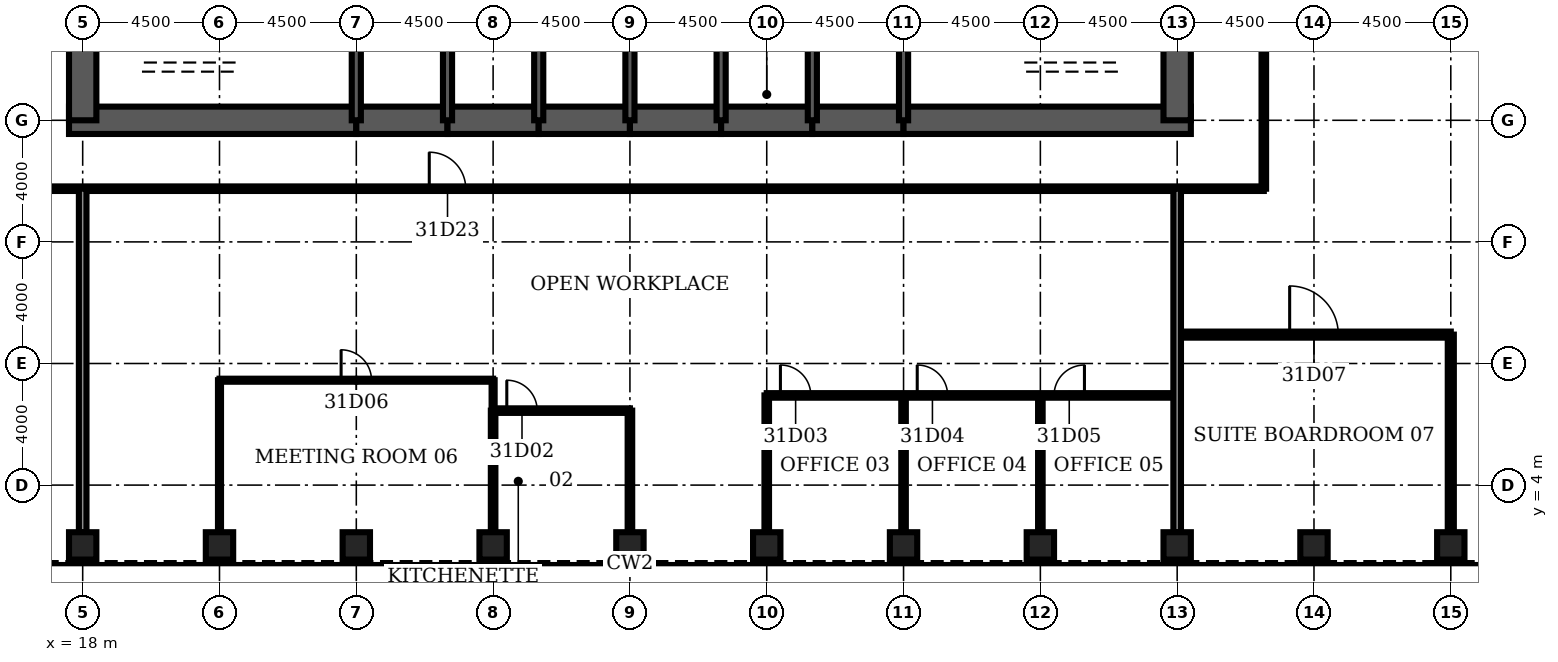
"""IFC4 building model, lengths in metres.
Left out: names, types, materials, properties, quantities, classifications, styles, units other than length and angle.
Written with IfcOpenShell. Run it as: python <this file> out.ifc"""

import sys

from ifc_helpers import new_model, si_unit, direction, frame, frame_2d, origin, origin_2d, place, context, subcontext, project, spatial, rectangle, hollow_rectangle, extrude, element, fill, save


model = new_model("IFC4")
c1 = context("Model", 3, precision=1e-05, world=origin(), true_north=direction((0.0, 1.0)))
c2 = subcontext(c1, "Body", "Model", "MODEL_VIEW")
j1 = project(units=[si_unit("LENGTHUNIT", "METRE"), si_unit("PLANEANGLEUNIT", "RADIAN")], contexts=[c1])
p1 = place(None, origin())
s1 = spatial("IfcSite", under=j1, at=p1, CompositionType="ELEMENT")
p2 = place(p1, origin())
s2 = spatial("IfcBuilding", under=s1, at=p2, CompositionType="ELEMENT")
p3 = place(p2, frame((0.0, 0.0, 142.5)))
s3 = spatial("IfcBuildingStorey", under=s2, at=p3, CompositionType="ELEMENT", Elevation=142.5)
for number, where, z_axis, x_axis in (
    (1, (18.0, 2.0, 0.0), (0.0, 0.0, 1.0), (0.0, 1.0, 0.0)),
    (2, (22.5, 2.0, 0.0), (0.0, 0.0, 1.0), (0.0, 1.0, 0.0)),
    (3, (27.0, 2.0, 0.0), (0.0, 0.0, 1.0), (0.0, 1.0, 0.0)),
    (4, (31.5, 2.0, 0.0), (0.0, 0.0, 1.0), (0.0, 1.0, 0.0)),
    (5, (36.0, 2.0, 0.0), (0.0, 0.0, 1.0), (0.0, 1.0, 0.0)),
    (6, (40.5, 2.0, 0.0), (0.0, 0.0, 1.0), (0.0, 1.0, 0.0)),
    (7, (45.0, 2.0, 0.0), (0.0, 0.0, 1.0), (0.0, 1.0, 0.0)),
    (8, (49.5, 2.0, 0.0), (0.0, 0.0, 1.0), (0.0, 1.0, 0.0)),
    (9, (54.0, 2.0, 0.0), (0.0, 0.0, 1.0), (0.0, 1.0, 0.0)),
    (10, (58.5, 2.0, 0.0), (0.0, 0.0, 1.0), (0.0, 1.0, 0.0)),
    (11, (63.0, 2.0, 0.0), (0.0, 0.0, 1.0), (0.0, 1.0, 0.0)),
):
    element("IfcColumn", number, at=place(p3, frame(where, z_axis=z_axis, x_axis=x_axis)), inside=s3, PredefinedType="COLUMN", context=c2, shape_type="SweptSolid", body=[
        extrude(hollow_rectangle(XDim=0.9, YDim=0.9, WallThickness=0.1, at=origin_2d()), origin(), (0.0, 0.0, 1.0), 4.2),
    ])
p4 = place(p3, frame((17.55, 16.0, 0.0), z_axis=(0.0, 0.0, 1.0), x_axis=(1.0, 0.0, 0.0)))
e12 = element("IfcWall", 12, at=p4, inside=s3, PredefinedType="SHEAR", context=c2, shape_type="SweptSolid", body=[
    extrude(rectangle(XDim=9.45, YDim=0.9, at=frame_2d((4.725, 0.0))), origin(), (0.0, 0.0, 1.0), 4.2),
])
for number, where, z_axis, x_axis in (
    (13, (27.0, 16.0, 0.0), (0.0, 0.0, 1.0), (1.0, 0.0, 0.0)),
    (14, (30.0, 16.0, 0.0), (0.0, 0.0, 1.0), (1.0, 0.0, 0.0)),
    (15, (33.0, 16.0, 0.0), (0.0, 0.0, 1.0), (1.0, 0.0, 0.0)),
    (16, (36.0, 16.0, 0.0), (0.0, 0.0, 1.0), (1.0, 0.0, 0.0)),
    (17, (39.0, 16.0, 0.0), (0.0, 0.0, 1.0), (1.0, 0.0, 0.0)),
    (18, (42.0, 16.0, 0.0), (0.0, 0.0, 1.0), (1.0, 0.0, 0.0)),
):
    element("IfcWall", number, at=place(p3, frame(where, z_axis=z_axis, x_axis=x_axis)), inside=s3, PredefinedType="SHEAR", context=c2, shape_type="SweptSolid", body=[
        extrude(rectangle(XDim=3.0, YDim=0.9, at=frame_2d((1.5, 0.0))), origin(), (0.0, 0.0, 1.0), 4.2),
    ])
p5 = place(p3, frame((45.0, 16.0, 0.0), z_axis=(0.0, 0.0, 1.0), x_axis=(1.0, 0.0, 0.0)))
e19 = element("IfcWall", 19, at=p5, inside=s3, PredefinedType="SHEAR", context=c2, shape_type="SweptSolid", body=[
    extrude(rectangle(XDim=9.45, YDim=0.9, at=frame_2d((4.725, 0.0))), origin(), (0.0, 0.0, 1.0), 4.2),
])
for number, where, z_axis, x_axis in (
    (20, (18.0, 19.2, 0.0), (0.0, 0.0, 1.0), (0.0, -1.0, 0.0)),
    (21, (54.0, 16.0, 0.0), (0.0, 0.0, 1.0), (0.0, 1.0, 0.0)),
):
    element("IfcWall", number, at=place(p3, frame(where, z_axis=z_axis, x_axis=x_axis)), inside=s3, PredefinedType="SHEAR", context=c2, shape_type="SweptSolid", body=[
        extrude(rectangle(XDim=3.2, YDim=0.9, at=frame_2d((1.6, 0.0))), origin(), (0.0, 0.0, 1.0), 4.2),
    ])
for number, where, z_axis, x_axis in (
    (22, (27.0, 16.0, 0.0), (0.0, 0.0, 1.0), (0.0, 1.0, 0.0)),
    (23, (30.0, 16.0, 0.0), (0.0, 0.0, 1.0), (0.0, 1.0, 0.0)),
    (24, (33.0, 16.0, 0.0), (0.0, 0.0, 1.0), (0.0, 1.0, 0.0)),
    (25, (36.0, 16.0, 0.0), (0.0, 0.0, 1.0), (0.0, 1.0, 0.0)),
    (26, (39.0, 16.0, 0.0), (0.0, 0.0, 1.0), (0.0, 1.0, 0.0)),
    (27, (42.0, 16.0, 0.0), (0.0, 0.0, 1.0), (0.0, 1.0, 0.0)),
    (28, (45.0, 16.0, 0.0), (0.0, 0.0, 1.0), (0.0, 1.0, 0.0)),
):
    element("IfcWall", number, at=place(p3, frame(where, z_axis=z_axis, x_axis=x_axis)), inside=s3, PredefinedType="SOLIDWALL", context=c2, shape_type="SweptSolid", body=[
        extrude(rectangle(XDim=3.2, YDim=0.3, at=frame_2d((1.6, 0.0))), origin(), (0.0, 0.0, 1.0), 4.2),
    ])
p6 = place(p3, frame((39.15, 17.4, 0.0), z_axis=(0.0, 0.0, 1.0), x_axis=(1.0, 0.0, 0.0)))
e29 = element("IfcWall", 29, at=p6, inside=s3, PredefinedType="SOLIDWALL", context=c2, shape_type="SweptSolid", body=[
    extrude(rectangle(XDim=2.7, YDim=0.3, at=frame_2d((1.35, 0.0))), origin(), (0.0, 0.0, 1.0), 4.04),
])
p7 = place(p6, frame((0.85, 0.0, 0.0)))
e30 = element("IfcOpeningElement", 30, at=p7, cuts=e29, PredefinedType="OPENING", context=c2, shape_type="SweptSolid", body=[
    extrude(rectangle(XDim=1.0, YDim=2.1, at=frame_2d((0.5, 1.05))), frame((0.0, 0.16, 0.0), z_axis=(0.0, -1.0, 0.0), x_axis=(1.0, 0.0, 0.0)), (0.0, 0.0, 1.0), 0.32),
])
p8 = place(p3, frame((31.5, 6.45, 0.0), z_axis=(0.0, 0.0, 1.0), x_axis=(1.0, 0.0, 0.0)))
e31 = element("IfcWall", 31, at=p8, inside=s3, PredefinedType="PARTITIONING", context=c2, shape_type="SweptSolid", body=[
    extrude(rectangle(XDim=4.5, YDim=0.15, at=frame_2d((2.25, 0.0))), origin(), (0.0, 0.0, 1.0), 3.0),
])
p9 = place(p8, frame((0.45, 0.0, 0.0)))
e32 = element("IfcOpeningElement", 32, at=p9, cuts=e31, PredefinedType="OPENING", context=c2, shape_type="SweptSolid", body=[
    extrude(rectangle(XDim=1.0, YDim=2.1, at=frame_2d((0.5, 1.05))), frame((0.0, 0.085, 0.0), z_axis=(0.0, -1.0, 0.0), x_axis=(1.0, 0.0, 0.0)), (0.0, 0.0, 1.0), 0.17),
])
p10 = place(p3, frame((40.5, 6.95, 0.0), z_axis=(0.0, 0.0, 1.0), x_axis=(1.0, 0.0, 0.0)))
e33 = element("IfcWall", 33, at=p10, inside=s3, PredefinedType="PARTITIONING", context=c2, shape_type="SweptSolid", body=[
    extrude(rectangle(XDim=13.5, YDim=0.15, at=frame_2d((6.75, 0.0))), origin(), (0.0, 0.0, 1.0), 3.0),
])
p11 = place(p10, frame((0.45, 0.0, 0.0)))
e34 = element("IfcOpeningElement", 34, at=p11, cuts=e33, PredefinedType="OPENING", context=c2, shape_type="SweptSolid", body=[
    extrude(rectangle(XDim=1.0, YDim=2.1, at=frame_2d((0.5, 1.05))), frame((0.0, 0.085, 0.0), z_axis=(0.0, -1.0, 0.0), x_axis=(1.0, 0.0, 0.0)), (0.0, 0.0, 1.0), 0.17),
])
p12 = place(p10, frame((4.95, 0.0, 0.0)))
e35 = element("IfcOpeningElement", 35, at=p12, cuts=e33, PredefinedType="OPENING", context=c2, shape_type="SweptSolid", body=[
    extrude(rectangle(XDim=1.0, YDim=2.1, at=frame_2d((0.5, 1.05))), frame((0.0, 0.085, 0.0), z_axis=(0.0, -1.0, 0.0), x_axis=(1.0, 0.0, 0.0)), (0.0, 0.0, 1.0), 0.17),
])
p13 = place(p10, frame((9.45, 0.0, 0.0)))
e36 = element("IfcOpeningElement", 36, at=p13, cuts=e33, PredefinedType="OPENING", context=c2, shape_type="SweptSolid", body=[
    extrude(rectangle(XDim=1.0, YDim=2.1, at=frame_2d((0.5, 1.05))), frame((0.0, 0.085, 0.0), z_axis=(0.0, -1.0, 0.0), x_axis=(1.0, 0.0, 0.0)), (0.0, 0.0, 1.0), 0.17),
])
p14 = place(p3, frame((22.5, 7.45, 0.0), z_axis=(0.0, 0.0, 1.0), x_axis=(1.0, 0.0, 0.0)))
e37 = element("IfcWall", 37, at=p14, inside=s3, PredefinedType="PARTITIONING", context=c2, shape_type="SweptSolid", body=[
    extrude(rectangle(XDim=9.0, YDim=0.1, at=frame_2d((4.5, 0.0))), origin(), (0.0, 0.0, 1.0), 3.0),
])
p15 = place(p14, frame((4.0, 0.0, 0.0)))
e38 = element("IfcOpeningElement", 38, at=p15, cuts=e37, PredefinedType="OPENING", context=c2, shape_type="SweptSolid", body=[
    extrude(rectangle(XDim=1.0, YDim=2.1, at=frame_2d((0.5, 1.05))), frame((0.0, 0.06, 0.0), z_axis=(0.0, -1.0, 0.0), x_axis=(1.0, 0.0, 0.0)), (0.0, 0.0, 1.0), 0.12),
])
p16 = place(p3, frame((54.0, 8.95, 0.0), z_axis=(0.0, 0.0, 1.0), x_axis=(1.0, 0.0, 0.0)))
e39 = element("IfcWall", 39, at=p16, inside=s3, PredefinedType="PARTITIONING", context=c2, shape_type="SweptSolid", body=[
    extrude(rectangle(XDim=9.0, YDim=0.2, at=frame_2d((4.5, 0.0))), origin(), (0.0, 0.0, 1.0), 3.0),
])
p17 = place(p16, frame((3.7, 0.0, 0.0)))
e40 = element("IfcOpeningElement", 40, at=p17, cuts=e39, PredefinedType="OPENING", context=c2, shape_type="SweptSolid", body=[
    extrude(rectangle(XDim=1.6, YDim=2.1, at=frame_2d((0.8, 1.05))), frame((0.0, 0.11, 0.0), z_axis=(0.0, -1.0, 0.0), x_axis=(1.0, 0.0, 0.0)), (0.0, 0.0, 1.0), 0.22),
])
p18 = place(p3, frame((15.15, 13.75, 0.0), z_axis=(0.0, 0.0, 1.0), x_axis=(1.0, 0.0, 0.0)))
e41 = element("IfcWall", 41, at=p18, inside=s3, PredefinedType="PARTITIONING", context=c2, shape_type="SweptSolid", body=[
    extrude(rectangle(XDim=41.7, YDim=0.15, at=frame_2d((20.85, 0.0))), origin(), (0.0, 0.0, 1.0), 3.0),
])
p19 = place(p18, frame((14.25, 0.0, 0.0)))
e42 = element("IfcOpeningElement", 42, at=p19, cuts=e41, PredefinedType="OPENING", context=c2, shape_type="SweptSolid", body=[
    extrude(rectangle(XDim=1.2, YDim=2.1, at=frame_2d((0.6, 1.05))), frame((0.0, 0.085, 0.0), z_axis=(0.0, -1.0, 0.0), x_axis=(1.0, 0.0, 0.0)), (0.0, 0.0, 1.0), 0.17),
])
p20 = place(p3, frame((18.0, 2.45, 0.0), z_axis=(0.0, 0.0, 1.0), x_axis=(0.0, 1.0, 0.0)))
e43 = element("IfcWall", 43, at=p20, inside=s3, PredefinedType="PARTITIONING", context=c2, shape_type="SweptSolid", body=[
    extrude(rectangle(XDim=11.3, YDim=0.25, at=frame_2d((5.65, 0.0))), origin(), (0.0, 0.0, 1.0), 3.0),
])
p21 = place(p3, frame((22.5, 2.45, 0.0), z_axis=(0.0, 0.0, 1.0), x_axis=(0.0, 1.0, 0.0)))
e44 = element("IfcWall", 44, at=p21, inside=s3, PredefinedType="PARTITIONING", context=c2, shape_type="SweptSolid", body=[
    extrude(rectangle(XDim=5.0, YDim=0.1, at=frame_2d((2.5, 0.0))), origin(), (0.0, 0.0, 1.0), 3.0),
])
p22 = place(p3, frame((31.5, 2.45, 0.0), z_axis=(0.0, 0.0, 1.0), x_axis=(0.0, 1.0, 0.0)))
e45 = element("IfcWall", 45, at=p22, inside=s3, PredefinedType="PARTITIONING", context=c2, shape_type="SweptSolid", body=[
    extrude(rectangle(XDim=4.0, YDim=0.15, at=frame_2d((2.0, 0.0))), origin(), (0.0, 0.0, 1.0), 3.0),
])
p23 = place(p3, frame((31.5, 6.45, 0.0), z_axis=(0.0, 0.0, 1.0), x_axis=(0.0, 1.0, 0.0)))
e46 = element("IfcWall", 46, at=p23, inside=s3, PredefinedType="PARTITIONING", context=c2, shape_type="SweptSolid", body=[
    extrude(rectangle(XDim=1.0, YDim=0.1, at=frame_2d((0.5, 0.0))), origin(), (0.0, 0.0, 1.0), 3.0),
])
p24 = place(p3, frame((36.0, 2.45, 0.0), z_axis=(0.0, 0.0, 1.0), x_axis=(0.0, 1.0, 0.0)))
e47 = element("IfcWall", 47, at=p24, inside=s3, PredefinedType="PARTITIONING", context=c2, shape_type="SweptSolid", body=[
    extrude(rectangle(XDim=4.0, YDim=0.15, at=frame_2d((2.0, 0.0))), origin(), (0.0, 0.0, 1.0), 3.0),
])
for number, where, z_axis, x_axis in (
    (48, (40.5, 2.45, 0.0), (0.0, 0.0, 1.0), (0.0, 1.0, 0.0)),
    (49, (45.0, 2.45, 0.0), (0.0, 0.0, 1.0), (0.0, 1.0, 0.0)),
    (50, (49.5, 2.45, 0.0), (0.0, 0.0, 1.0), (0.0, 1.0, 0.0)),
):
    element("IfcWall", number, at=place(p3, frame(where, z_axis=z_axis, x_axis=x_axis)), inside=s3, PredefinedType="PARTITIONING", context=c2, shape_type="SweptSolid", body=[
        extrude(rectangle(XDim=4.5, YDim=0.15, at=frame_2d((2.25, 0.0))), origin(), (0.0, 0.0, 1.0), 3.0),
    ])
p25 = place(p3, frame((54.0, 2.45, 0.0), z_axis=(0.0, 0.0, 1.0), x_axis=(0.0, 1.0, 0.0)))
e51 = element("IfcWall", 51, at=p25, inside=s3, PredefinedType="PARTITIONING", context=c2, shape_type="SweptSolid", body=[
    extrude(rectangle(XDim=11.3, YDim=0.25, at=frame_2d((5.65, 0.0))), origin(), (0.0, 0.0, 1.0), 3.0),
])
p26 = place(p3, frame((56.85, 13.75, 0.0), z_axis=(0.0, 0.0, 1.0), x_axis=(0.0, 1.0, 0.0)))
e52 = element("IfcWall", 52, at=p26, inside=s3, PredefinedType="PARTITIONING", context=c2, shape_type="SweptSolid", body=[
    extrude(rectangle(XDim=20.5, YDim=0.15, at=frame_2d((10.25, 0.0))), origin(), (0.0, 0.0, 1.0), 3.0),
])
p27 = place(p26, frame((9.65, 0.0, 0.0)))
e53 = element("IfcOpeningElement", 53, at=p27, cuts=e52, PredefinedType="OPENING", context=c2, shape_type="SweptSolid", body=[
    extrude(rectangle(XDim=1.2, YDim=2.1, at=frame_2d((0.6, 1.05))), frame((0.0, 0.085, 0.0), z_axis=(0.0, -1.0, 0.0), x_axis=(1.0, 0.0, 0.0)), (0.0, 0.0, 1.0), 0.17),
])
p28 = place(p3, frame((63.0, 2.45, 0.0), z_axis=(0.0, 0.0, 1.0), x_axis=(0.0, 1.0, 0.0)))
e54 = element("IfcWall", 54, at=p28, inside=s3, PredefinedType="PARTITIONING", context=c2, shape_type="SweptSolid", body=[
    extrude(rectangle(XDim=6.5, YDim=0.2, at=frame_2d((3.25, 0.0))), origin(), (0.0, 0.0, 1.0), 3.0),
])
p29 = place(p7, origin())
e55 = element("IfcDoor", 55, at=p29, inside=s3, OperationType="SINGLE_SWING_LEFT", PredefinedType="DOOR", context=c2, shape_type="SweptSolid", body=[
    extrude(rectangle(XDim=1.0, YDim=2.1, at=frame_2d((0.5, 1.05))), frame((0.0, 0.025, 0.0), z_axis=(0.0, -1.0, 0.0), x_axis=(1.0, 0.0, 0.0)), (0.0, 0.0, 1.0), 0.05),
])
fill(e30, e55)
p30 = place(p9, origin())
e56 = element("IfcDoor", 56, at=p30, inside=s3, OperationType="SINGLE_SWING_LEFT", PredefinedType="DOOR", context=c2, shape_type="SweptSolid", body=[
    extrude(rectangle(XDim=1.0, YDim=2.1, at=frame_2d((0.5, 1.05))), frame((0.0, 0.025, 0.0), z_axis=(0.0, -1.0, 0.0), x_axis=(1.0, 0.0, 0.0)), (0.0, 0.0, 1.0), 0.05),
])
fill(e32, e56)
p31 = place(p11, origin())
e57 = element("IfcDoor", 57, at=p31, inside=s3, OperationType="SINGLE_SWING_LEFT", PredefinedType="DOOR", context=c2, shape_type="SweptSolid", body=[
    extrude(rectangle(XDim=1.0, YDim=2.1, at=frame_2d((0.5, 1.05))), frame((0.0, 0.025, 0.0), z_axis=(0.0, -1.0, 0.0), x_axis=(1.0, 0.0, 0.0)), (0.0, 0.0, 1.0), 0.05),
])
fill(e34, e57)
p32 = place(p12, origin())
e58 = element("IfcDoor", 58, at=p32, inside=s3, OperationType="SINGLE_SWING_LEFT", PredefinedType="DOOR", context=c2, shape_type="SweptSolid", body=[
    extrude(rectangle(XDim=1.0, YDim=2.1, at=frame_2d((0.5, 1.05))), frame((0.0, 0.025, 0.0), z_axis=(0.0, -1.0, 0.0), x_axis=(1.0, 0.0, 0.0)), (0.0, 0.0, 1.0), 0.05),
])
fill(e35, e58)
p33 = place(p13, origin())
e59 = element("IfcDoor", 59, at=p33, inside=s3, OperationType="SINGLE_SWING_RIGHT", PredefinedType="DOOR", context=c2, shape_type="SweptSolid", body=[
    extrude(rectangle(XDim=1.0, YDim=2.1, at=frame_2d((0.5, 1.05))), frame((0.0, 0.025, 0.0), z_axis=(0.0, -1.0, 0.0), x_axis=(1.0, 0.0, 0.0)), (0.0, 0.0, 1.0), 0.05),
])
fill(e36, e59)
p34 = place(p15, origin())
e60 = element("IfcDoor", 60, at=p34, inside=s3, OperationType="SINGLE_SWING_LEFT", PredefinedType="DOOR", context=c2, shape_type="SweptSolid", body=[
    extrude(rectangle(XDim=1.0, YDim=2.1, at=frame_2d((0.5, 1.05))), frame((0.0, 0.025, 0.0), z_axis=(0.0, -1.0, 0.0), x_axis=(1.0, 0.0, 0.0)), (0.0, 0.0, 1.0), 0.05),
])
fill(e38, e60)
p35 = place(p17, origin())
e61 = element("IfcDoor", 61, at=p35, inside=s3, OperationType="SINGLE_SWING_LEFT", PredefinedType="DOOR", context=c2, shape_type="SweptSolid", body=[
    extrude(rectangle(XDim=1.6, YDim=2.1, at=frame_2d((0.8, 1.05))), frame((0.0, 0.025, 0.0), z_axis=(0.0, -1.0, 0.0), x_axis=(1.0, 0.0, 0.0)), (0.0, 0.0, 1.0), 0.05),
])
fill(e40, e61)
p36 = place(p19, origin())
e62 = element("IfcDoor", 62, at=p36, inside=s3, OperationType="SINGLE_SWING_LEFT", PredefinedType="DOOR", context=c2, shape_type="SweptSolid", body=[
    extrude(rectangle(XDim=1.2, YDim=2.1, at=frame_2d((0.6, 1.05))), frame((0.0, 0.025, 0.0), z_axis=(0.0, -1.0, 0.0), x_axis=(1.0, 0.0, 0.0)), (0.0, 0.0, 1.0), 0.05),
])
fill(e42, e62)
save(model, sys.argv[1])
